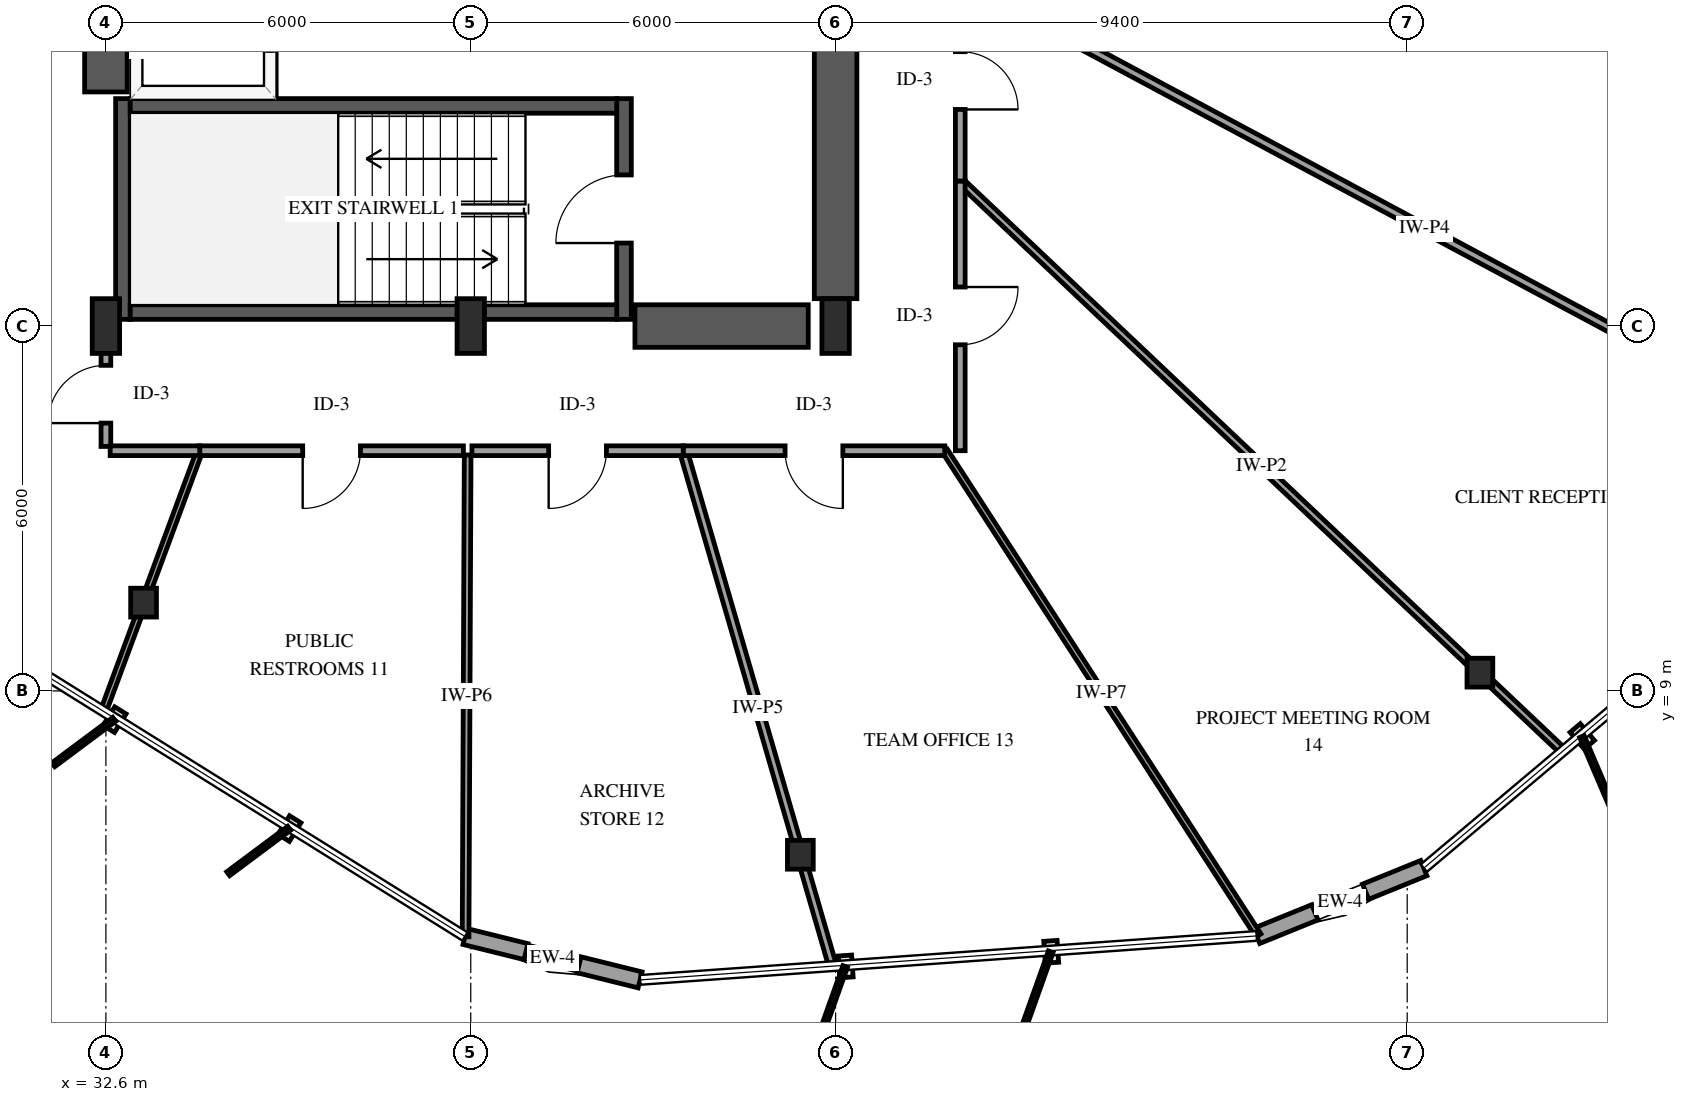
"""IFC4 building model, lengths in metres.
Left out: names, types, materials, properties, quantities, classifications, styles, units other than length and angle.
Written with IfcOpenShell. Run it as: python <this file> out.ifc"""

import sys

from ifc_helpers import new_model, si_unit, direction, frame, frame_2d, origin, origin_2d, place, context, subcontext, project, spatial, rectangle, i_section, extrude, element, fill, save


model = new_model("IFC4")
c1 = context("Model", 3, precision=1e-05, world=origin(), true_north=direction((0.0, 1.0)))
c2 = subcontext(c1, "Body", "Model", "MODEL_VIEW")
j1 = project(units=[si_unit("LENGTHUNIT", "METRE"), si_unit("PLANEANGLEUNIT", "RADIAN")], contexts=[c1])
p1 = place(None, origin())
s1 = spatial("IfcSite", under=j1, at=p1, CompositionType="ELEMENT")
p2 = place(p1, origin())
s2 = spatial("IfcBuilding", under=s1, at=p2, CompositionType="ELEMENT")
p3 = place(p2, frame((0.0, 0.0, 42.6)))
s3 = spatial("IfcBuildingStorey", under=s2, at=p3, CompositionType="ELEMENT", Elevation=42.6)
p4 = place(p3, frame((32.88, 15.11, 0.0), z_axis=(0.0, 0.0, 1.0), x_axis=(0.0, 1.0, 0.0)))
e1 = element("IfcWall", 1, at=p4, inside=s3, PredefinedType="SHEAR", context=c2, shape_type="SweptSolid", body=[
    extrude(rectangle(XDim=3.63, YDim=0.24, at=frame_2d((1.815, 0.0))), origin(), (0.0, 0.0, 1.0), 4.0),
])
p5 = place(p3, frame((41.12, 15.11, 0.0), z_axis=(0.0, 0.0, 1.0), x_axis=(0.0, 1.0, 0.0)))
e2 = element("IfcWall", 2, at=p5, inside=s3, PredefinedType="SHEAR", context=c2, shape_type="SweptSolid", body=[
    extrude(rectangle(XDim=3.63, YDim=0.24, at=frame_2d((1.815, 0.0))), origin(), (0.0, 0.0, 1.0), 4.0),
])
p6 = place(p5, frame((1.255, 0.0, 0.0)))
e3 = element("IfcOpeningElement", 3, at=p6, cuts=e2, PredefinedType="OPENING", context=c2, shape_type="SweptSolid", body=[
    extrude(rectangle(XDim=1.12, YDim=2.15, at=frame_2d((0.56, 1.075))), frame((0.0, 0.13, 0.0), z_axis=(0.0, -1.0, 0.0), x_axis=(1.0, 0.0, 0.0)), (0.0, 0.0, 1.0), 0.26),
])
for number, where, z_axis, x_axis in (
    (4, (33.0, 15.23, 0.0), (0.0, 0.0, 1.0), (1.0, 0.0, 0.0)),
    (5, (33.0, 18.62, 0.0), (0.0, 0.0, 1.0), (1.0, 0.0, 0.0)),
):
    element("IfcWall", number, at=place(p3, frame(where, z_axis=z_axis, x_axis=x_axis)), inside=s3, PredefinedType="SHEAR", context=c2, shape_type="SweptSolid", body=[
        extrude(rectangle(XDim=8.0, YDim=0.24, at=frame_2d((4.0, 0.0))), origin(), (0.0, 0.0, 1.0), 4.0),
    ])
p7 = place(p3, frame((32.6, 18.85, 0.0), z_axis=(0.0, 0.0, 1.0), x_axis=(0.0, 1.0, 0.0)))
e6 = element("IfcWall", 6, at=p7, inside=s3, PredefinedType="SHEAR", context=c2, shape_type="SweptSolid", body=[
    extrude(rectangle(XDim=12.3, YDim=0.7, at=frame_2d((6.15, 0.0))), origin(), (0.0, 0.0, 1.0), 4.0),
])
p8 = place(p3, frame((41.3, 15.0, 0.0), z_axis=(0.0, 0.0, 1.0), x_axis=(1.0, 0.0, 0.0)))
e7 = element("IfcWall", 7, at=p8, inside=s3, PredefinedType="SHEAR", context=c2, shape_type="SweptSolid", body=[
    extrude(rectangle(XDim=2.85, YDim=0.7, at=frame_2d((1.425, 0.0))), origin(), (0.0, 0.0, 1.0), 4.0),
])
p9 = place(p3, frame((44.6, 15.45, 0.0), z_axis=(0.0, 0.0, 1.0), x_axis=(0.0, 1.0, 0.0)))
e8 = element("IfcWall", 8, at=p9, inside=s3, PredefinedType="SHEAR", context=c2, shape_type="SweptSolid", body=[
    extrude(rectangle(XDim=6.35, YDim=0.7, at=frame_2d((3.175, 0.0))), origin(), (0.0, 0.0, 1.0), 4.0),
])
for number, where, z_axis, x_axis in (
    (9, (32.6, 15.0, 0.0), (0.0, 0.0, 1.0), (1.0, 0.0, 0.0)),
    (10, (38.6, 15.0, 0.0), (0.0, 0.0, 1.0), (1.0, 0.0, 0.0)),
    (11, (44.6, 15.0, 0.0), (0.0, 0.0, 1.0), (1.0, 0.0, 0.0)),
):
    element("IfcColumn", number, at=place(p3, frame(where, z_axis=z_axis, x_axis=x_axis)), inside=s3, PredefinedType="PILASTER", context=c2, shape_type="SweptSolid", body=[
        extrude(rectangle(XDim=0.45, YDim=0.9, at=origin_2d()), origin(), (0.0, 0.0, 1.0), 4.0),
    ])
for number, where, z_axis, x_axis in (
    (12, (33.219, 10.452, 0.0), (0.0, 0.0, 1.0), (1.0, 0.0, 0.0)),
    (13, (44.02, 6.306, 0.0), (0.0, 0.0, 1.0), (1.0, 0.0, 0.0)),
    (14, (55.196, 9.3, 0.0), (0.0, 0.0, 1.0), (1.0, 0.0, 0.0)),
):
    element("IfcColumn", number, at=place(p3, frame(where, z_axis=z_axis, x_axis=x_axis)), inside=s3, PredefinedType="COLUMN", context=c2, shape_type="SweptSolid", body=[
        extrude(i_section(OverallWidth=0.424, OverallDepth=0.474, WebThickness=0.048, FlangeThickness=0.077, FilletRadius=0.038, at=origin_2d()), origin(), (0.0, 0.0, 1.0), 4.0),
    ])
p10 = place(p3, frame((38.505, 4.961, 0.0), z_axis=(0.0, 0.0, 1.0), x_axis=(0.970634283387, -0.240559946612, 0.0)))
e15 = element("IfcWall", 15, at=p10, inside=s3, PredefinedType="SOLIDWALL", context=c2, shape_type="SweptSolid", body=[
    extrude(rectangle(XDim=2.967, YDim=0.27, at=frame_2d((1.483, 0.0))), origin(), (0.0, 0.0, 1.0), 3.079),
])
p11 = place(p10, frame((1.033, 0.0, 0.75)))
e16 = element("IfcOpeningElement", 16, at=p11, cuts=e15, PredefinedType="OPENING", context=c2, shape_type="SweptSolid", body=[
    extrude(rectangle(XDim=0.9, YDim=1.5, at=frame_2d((0.45, 0.75))), frame((0.0, 0.145, 0.0), z_axis=(0.0, -1.0, 0.0), x_axis=(1.0, 0.0, 0.0)), (0.0, 0.0, 1.0), 0.29),
])
p12 = place(p3, frame((51.524, 4.971, 0.0), z_axis=(0.0, 0.0, 1.0), x_axis=(0.926649408299, 0.375926687132, 0.0)))
e17 = element("IfcWall", 17, at=p12, inside=s3, PredefinedType="SOLIDWALL", context=c2, shape_type="SweptSolid", body=[
    extrude(rectangle(XDim=2.967, YDim=0.27, at=frame_2d((1.483, 0.0))), origin(), (0.0, 0.0, 1.0), 3.079),
])
p13 = place(p12, frame((1.033, 0.0, 0.75)))
e18 = element("IfcOpeningElement", 18, at=p13, cuts=e17, PredefinedType="OPENING", context=c2, shape_type="SweptSolid", body=[
    extrude(rectangle(XDim=0.9, YDim=1.5, at=frame_2d((0.45, 0.75))), frame((0.0, 0.145, 0.0), z_axis=(0.0, -1.0, 0.0), x_axis=(1.0, 0.0, 0.0)), (0.0, 0.0, 1.0), 0.29),
])
p14 = place(p3, frame((35.3, 18.79, 0.0), z_axis=(0.0, 0.0, 1.0), x_axis=(0.0, 1.0, 0.0)))
e19 = element("IfcWall", 19, at=p14, inside=s3, PredefinedType="SOLIDWALL", context=c2, shape_type="SweptSolid", body=[
    extrude(rectangle(XDim=2.55, YDim=0.2, at=frame_2d((1.275, 0.0))), origin(), (0.0, 0.0, 1.0), 3.7),
])
p15 = place(p14, frame((0.725, 0.0, 0.0)))
e20 = element("IfcOpeningElement", 20, at=p15, cuts=e19, PredefinedType="OPENING", context=c2, shape_type="SweptSolid", body=[
    extrude(rectangle(XDim=1.1, YDim=2.15, at=frame_2d((0.55, 1.075))), frame((0.0, 0.11, 0.0), z_axis=(0.0, -1.0, 0.0), x_axis=(1.0, 0.0, 0.0)), (0.0, 0.0, 1.0), 0.22),
])
p16 = place(p3, frame((46.65, 22.738, 0.0), z_axis=(0.0, 0.0, 1.0), x_axis=(0.962729980638, -0.270464386531, 0.0)))
e21 = element("IfcWall", 21, at=p16, inside=s3, PredefinedType="PARTITIONING", context=c2, shape_type="SweptSolid", body=[
    extrude(rectangle(XDim=18.305, YDim=0.1, at=frame_2d((9.153, 0.0))), origin(), (0.0, 0.0, 1.0), 2.995),
])
p17 = place(p3, frame((46.65, 20.689, 0.0), z_axis=(0.0, 0.0, 1.0), x_axis=(0.881597742857, -0.472001504012, 0.0)))
e22 = element("IfcWall", 22, at=p17, inside=s3, PredefinedType="PARTITIONING", context=c2, shape_type="SweptSolid", body=[
    extrude(rectangle(XDim=17.315, YDim=0.14, at=frame_2d((8.658, 0.0))), origin(), (0.0, 0.0, 1.0), 3.078),
])
p18 = place(p3, frame((46.65, 17.385, 0.0), z_axis=(0.0, 0.0, 1.0), x_axis=(0.726449099084, -0.68722027505, 0.0)))
e23 = element("IfcWall", 23, at=p18, inside=s3, PredefinedType="PARTITIONING", context=c2, shape_type="SweptSolid", body=[
    extrude(rectangle(XDim=13.642, YDim=0.12, at=frame_2d((6.821, 0.0))), origin(), (0.0, 0.0, 1.0), 2.995),
])
p19 = place(p3, frame((46.395, 12.95, 0.0), z_axis=(0.0, 0.0, 1.0), x_axis=(0.543178785991, -0.839617059408, 0.0)))
e24 = element("IfcWall", 24, at=p19, inside=s3, PredefinedType="PARTITIONING", context=c2, shape_type="SweptSolid", body=[
    extrude(rectangle(XDim=9.496, YDim=0.1, at=frame_2d((4.748, 0.0))), origin(), (0.0, 0.0, 1.0), 3.078),
])
p20 = place(p3, frame((42.094, 12.95, 0.0), z_axis=(0.0, 0.0, 1.0), x_axis=(0.278489239335, -0.960439349243, 0.0)))
e25 = element("IfcWall", 25, at=p20, inside=s3, PredefinedType="PARTITIONING", context=c2, shape_type="SweptSolid", body=[
    extrude(rectangle(XDim=8.826, YDim=0.13, at=frame_2d((4.413, 0.0))), origin(), (0.0, 0.0, 1.0), 2.995),
])
p21 = place(p3, frame((38.549, 12.88, 0.0), z_axis=(0.0, 0.0, 1.0), x_axis=(-0.004314023704, -0.999990694556, 0.0)))
e26 = element("IfcWall", 26, at=p21, inside=s3, PredefinedType="PARTITIONING", context=c2, shape_type="SweptSolid", body=[
    extrude(rectangle(XDim=7.923, YDim=0.11, at=frame_2d((3.961, 0.0))), origin(), (0.0, 0.0, 1.0), 3.078),
])
p22 = place(p3, frame((34.143, 12.95, 0.0), z_axis=(0.0, 0.0, 1.0), x_axis=(-0.346990546702, -0.937868626461, 0.0)))
e27 = element("IfcWall", 27, at=p22, inside=s3, PredefinedType="PARTITIONING", context=c2, shape_type="SweptSolid", body=[
    extrude(rectangle(XDim=4.568, YDim=0.1, at=frame_2d((2.284, 0.0))), origin(), (0.0, 0.0, 1.0), 2.995),
])
p23 = place(p3, frame((46.65, 17.385, 0.0), z_axis=(0.0, 0.0, 1.0), x_axis=(0.0, -1.0, 0.0)))
e28 = element("IfcWall", 28, at=p23, inside=s3, PredefinedType="PARTITIONING", context=c2, shape_type="SweptSolid", body=[
    extrude(rectangle(XDim=4.435, YDim=0.16, at=frame_2d((2.218, 0.0))), origin(), (0.0, 0.0, 1.0), 3.7),
])
p24 = place(p23, frame((1.743, 0.0, 0.0)))
e29 = element("IfcOpeningElement", 29, at=p24, cuts=e28, PredefinedType="OPENING", context=c2, shape_type="SweptSolid", body=[
    extrude(rectangle(XDim=0.95, YDim=2.15, at=frame_2d((0.475, 1.075))), frame((0.0, 0.09, 0.0), z_axis=(0.0, -1.0, 0.0), x_axis=(1.0, 0.0, 0.0)), (0.0, 0.0, 1.0), 0.18),
])
p25 = place(p3, frame((38.479, 12.95, 0.0), z_axis=(0.0, 0.0, 1.0), x_axis=(-1.0, 0.0, 0.0)))
e30 = element("IfcWall", 30, at=p25, inside=s3, PredefinedType="PARTITIONING", context=c2, shape_type="SweptSolid", body=[
    extrude(rectangle(XDim=4.336, YDim=0.16, at=frame_2d((2.168, 0.0))), origin(), (0.0, 0.0, 1.0), 3.7),
])
p26 = place(p25, frame((1.693, 0.0, 0.0)))
e31 = element("IfcOpeningElement", 31, at=p26, cuts=e30, PredefinedType="OPENING", context=c2, shape_type="SweptSolid", body=[
    extrude(rectangle(XDim=0.95, YDim=2.15, at=frame_2d((0.475, 1.075))), frame((0.0, 0.09, 0.0), z_axis=(0.0, -1.0, 0.0), x_axis=(1.0, 0.0, 0.0)), (0.0, 0.0, 1.0), 0.18),
])
p27 = place(p3, frame((46.395, 12.95, 0.0), z_axis=(0.0, 0.0, 1.0), x_axis=(-1.0, 0.0, 0.0)))
e32 = element("IfcWall", 32, at=p27, inside=s3, PredefinedType="PARTITIONING", context=c2, shape_type="SweptSolid", body=[
    extrude(rectangle(XDim=4.301, YDim=0.16, at=frame_2d((2.15, 0.0))), origin(), (0.0, 0.0, 1.0), 3.7),
])
p28 = place(p27, frame((1.676, 0.0, 0.0)))
e33 = element("IfcOpeningElement", 33, at=p28, cuts=e32, PredefinedType="OPENING", context=c2, shape_type="SweptSolid", body=[
    extrude(rectangle(XDim=0.95, YDim=2.15, at=frame_2d((0.475, 1.075))), frame((0.0, 0.09, 0.0), z_axis=(0.0, -1.0, 0.0), x_axis=(1.0, 0.0, 0.0)), (0.0, 0.0, 1.0), 0.18),
])
p29 = place(p3, frame((42.094, 12.95, 0.0), z_axis=(0.0, 0.0, 1.0), x_axis=(-1.0, 0.0, 0.0)))
e34 = element("IfcWall", 34, at=p29, inside=s3, PredefinedType="PARTITIONING", context=c2, shape_type="SweptSolid", body=[
    extrude(rectangle(XDim=3.475, YDim=0.16, at=frame_2d((1.738, 0.0))), origin(), (0.0, 0.0, 1.0), 3.7),
])
p30 = place(p29, frame((1.263, 0.0, 0.0)))
e35 = element("IfcOpeningElement", 35, at=p30, cuts=e34, PredefinedType="OPENING", context=c2, shape_type="SweptSolid", body=[
    extrude(rectangle(XDim=0.95, YDim=2.15, at=frame_2d((0.475, 1.075))), frame((0.0, 0.09, 0.0), z_axis=(0.0, -1.0, 0.0), x_axis=(1.0, 0.0, 0.0)), (0.0, 0.0, 1.0), 0.18),
])
p31 = place(p3, frame((46.65, 20.689, 0.0), z_axis=(0.0, 0.0, 1.0), x_axis=(0.0, -1.0, 0.0)))
e36 = element("IfcWall", 36, at=p31, inside=s3, PredefinedType="PARTITIONING", context=c2, shape_type="SweptSolid", body=[
    extrude(rectangle(XDim=3.304, YDim=0.16, at=frame_2d((1.652, 0.0))), origin(), (0.0, 0.0, 1.0), 3.7),
])
p32 = place(p31, frame((1.177, 0.0, 0.0)))
e37 = element("IfcOpeningElement", 37, at=p32, cuts=e36, PredefinedType="OPENING", context=c2, shape_type="SweptSolid", body=[
    extrude(rectangle(XDim=0.95, YDim=2.15, at=frame_2d((0.475, 1.075))), frame((0.0, 0.09, 0.0), z_axis=(0.0, -1.0, 0.0), x_axis=(1.0, 0.0, 0.0)), (0.0, 0.0, 1.0), 0.18),
])
p33 = place(p3, frame((32.6, 13.02, 0.0), z_axis=(0.0, 0.0, 1.0), x_axis=(0.0, 1.0, 0.0)))
e38 = element("IfcWall", 38, at=p33, inside=s3, PredefinedType="PARTITIONING", context=c2, shape_type="SweptSolid", body=[
    extrude(rectangle(XDim=1.91, YDim=0.16, at=frame_2d((0.955, 0.0))), origin(), (0.0, 0.0, 1.0), 3.7),
])
p34 = place(p33, frame((0.384, 0.0, 0.0)))
e39 = element("IfcOpeningElement", 39, at=p34, cuts=e38, PredefinedType="OPENING", context=c2, shape_type="SweptSolid", body=[
    extrude(rectangle(XDim=0.95, YDim=2.15, at=frame_2d((0.475, 1.075))), frame((0.0, 0.09, 0.0), z_axis=(0.0, -1.0, 0.0), x_axis=(1.0, 0.0, 0.0)), (0.0, 0.0, 1.0), 0.18),
])
p35 = place(p3, frame((34.143, 12.95, 0.0), z_axis=(0.0, 0.0, 1.0), x_axis=(-1.0, 0.0, 0.0)))
e40 = element("IfcWall", 40, at=p35, inside=s3, PredefinedType="PARTITIONING", context=c2, shape_type="SweptSolid", body=[
    extrude(rectangle(XDim=1.473, YDim=0.16, at=frame_2d((0.737, 0.0))), origin(), (0.0, 0.0, 1.0), 3.7),
])
p36 = place(p11, origin())
e41 = element("IfcWindow", 41, at=p36, inside=s3, PartitioningType="SINGLE_PANEL", PredefinedType="WINDOW", context=c2, shape_type="SweptSolid", body=[
    extrude(rectangle(XDim=0.9, YDim=1.5, at=frame_2d((0.45, 0.75))), frame((0.0, 0.03, 0.0), z_axis=(0.0, -1.0, 0.0), x_axis=(1.0, 0.0, 0.0)), (0.0, 0.0, 1.0), 0.06),
])
fill(e16, e41)
p37 = place(p13, origin())
e42 = element("IfcWindow", 42, at=p37, inside=s3, PartitioningType="SINGLE_PANEL", PredefinedType="WINDOW", context=c2, shape_type="SweptSolid", body=[
    extrude(rectangle(XDim=0.9, YDim=1.5, at=frame_2d((0.45, 0.75))), frame((0.0, 0.03, 0.0), z_axis=(0.0, -1.0, 0.0), x_axis=(1.0, 0.0, 0.0)), (0.0, 0.0, 1.0), 0.06),
])
fill(e18, e42)
p38 = place(p6, origin())
e43 = element("IfcDoor", 43, at=p38, inside=s3, OperationType="SINGLE_SWING_LEFT", PredefinedType="DOOR", context=c2, shape_type="SweptSolid", body=[
    extrude(rectangle(XDim=1.12, YDim=2.15, at=frame_2d((0.56, 1.075))), frame((0.0, 0.025, 0.0), z_axis=(0.0, -1.0, 0.0), x_axis=(1.0, 0.0, 0.0)), (0.0, 0.0, 1.0), 0.05),
])
fill(e3, e43)
p39 = place(p24, origin())
e44 = element("IfcDoor", 44, at=p39, inside=s3, OperationType="SINGLE_SWING_LEFT", PredefinedType="DOOR", context=c2, shape_type="SweptSolid", body=[
    extrude(rectangle(XDim=0.95, YDim=2.15, at=frame_2d((0.475, 1.075))), frame((0.0, 0.025, 0.0), z_axis=(0.0, -1.0, 0.0), x_axis=(1.0, 0.0, 0.0)), (0.0, 0.0, 1.0), 0.05),
])
fill(e29, e44)
p40 = place(p26, origin())
e45 = element("IfcDoor", 45, at=p40, inside=s3, OperationType="SINGLE_SWING_RIGHT", PredefinedType="DOOR", context=c2, shape_type="SweptSolid", body=[
    extrude(rectangle(XDim=0.95, YDim=2.15, at=frame_2d((0.475, 1.075))), frame((0.0, 0.025, 0.0), z_axis=(0.0, -1.0, 0.0), x_axis=(1.0, 0.0, 0.0)), (0.0, 0.0, 1.0), 0.05),
])
fill(e31, e45)
p41 = place(p28, origin())
e46 = element("IfcDoor", 46, at=p41, inside=s3, OperationType="SINGLE_SWING_LEFT", PredefinedType="DOOR", context=c2, shape_type="SweptSolid", body=[
    extrude(rectangle(XDim=0.95, YDim=2.15, at=frame_2d((0.475, 1.075))), frame((0.0, 0.025, 0.0), z_axis=(0.0, -1.0, 0.0), x_axis=(1.0, 0.0, 0.0)), (0.0, 0.0, 1.0), 0.05),
])
fill(e33, e46)
p42 = place(p30, origin())
e47 = element("IfcDoor", 47, at=p42, inside=s3, OperationType="SINGLE_SWING_RIGHT", PredefinedType="DOOR", context=c2, shape_type="SweptSolid", body=[
    extrude(rectangle(XDim=0.95, YDim=2.15, at=frame_2d((0.475, 1.075))), frame((0.0, 0.025, 0.0), z_axis=(0.0, -1.0, 0.0), x_axis=(1.0, 0.0, 0.0)), (0.0, 0.0, 1.0), 0.05),
])
fill(e35, e47)
p43 = place(p32, origin())
e48 = element("IfcDoor", 48, at=p43, inside=s3, OperationType="SINGLE_SWING_RIGHT", PredefinedType="DOOR", context=c2, shape_type="SweptSolid", body=[
    extrude(rectangle(XDim=0.95, YDim=2.15, at=frame_2d((0.475, 1.075))), frame((0.0, 0.025, 0.0), z_axis=(0.0, -1.0, 0.0), x_axis=(1.0, 0.0, 0.0)), (0.0, 0.0, 1.0), 0.05),
])
fill(e37, e48)
p44 = place(p34, origin())
e49 = element("IfcDoor", 49, at=p44, inside=s3, OperationType="SINGLE_SWING_LEFT", PredefinedType="DOOR", context=c2, shape_type="SweptSolid", body=[
    extrude(rectangle(XDim=0.95, YDim=2.15, at=frame_2d((0.475, 1.075))), frame((0.0, 0.025, 0.0), z_axis=(0.0, -1.0, 0.0), x_axis=(1.0, 0.0, 0.0)), (0.0, 0.0, 1.0), 0.05),
])
fill(e39, e49)
save(model, sys.argv[1])
